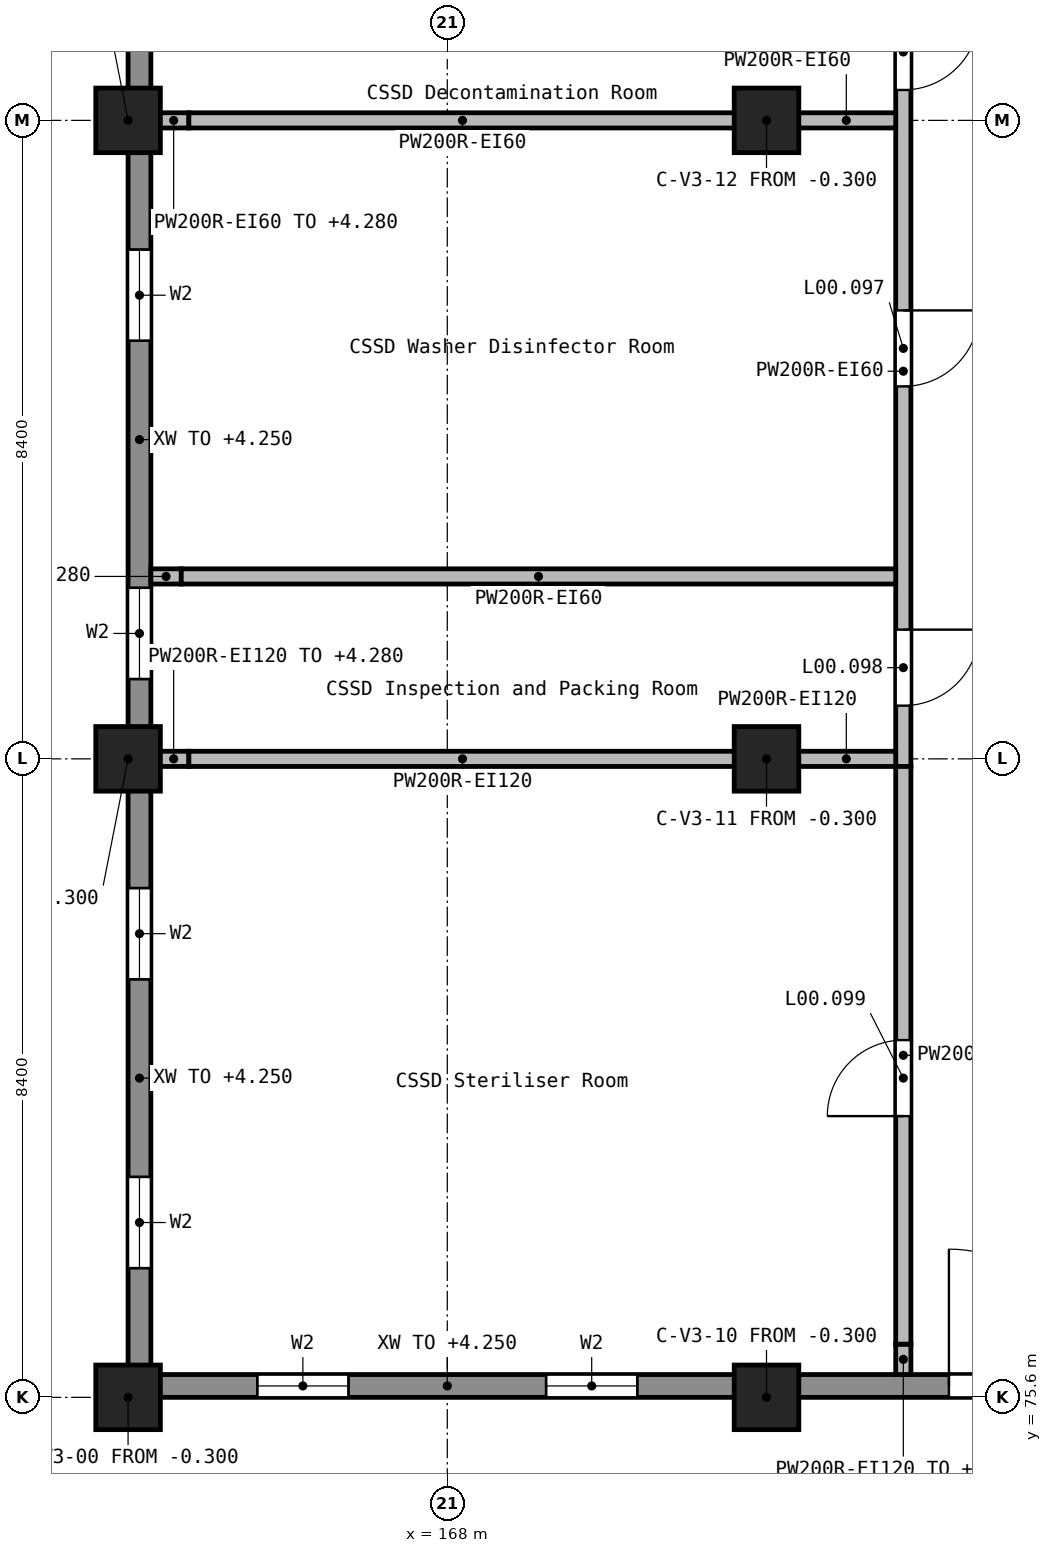
"""IFC4 building model, lengths in metres.
Left out: names, types, materials, properties, quantities, classifications, styles, units other than length and angle.
Written with IfcOpenShell. Run it as: python <this file> out.ifc"""

import sys

from ifc_helpers import new_model, si_unit, direction, frame, frame_2d, origin, origin_2d, place, context, subcontext, project, spatial, rectangle, extrude, element, fill, save


model = new_model("IFC4")
c1 = context("Model", 3, precision=1e-05, world=origin(), true_north=direction((0.0, 1.0)))
c2 = subcontext(c1, "Body", "Model", "MODEL_VIEW")
j1 = project(units=[si_unit("LENGTHUNIT", "METRE"), si_unit("PLANEANGLEUNIT", "RADIAN")], contexts=[c1])
p1 = place(None, origin())
s1 = spatial("IfcSite", under=j1, at=p1, CompositionType="ELEMENT")
p2 = place(p1, origin())
s2 = spatial("IfcBuilding", under=s1, at=p2, CompositionType="ELEMENT")
p3 = place(p2, origin())
s3 = spatial("IfcBuildingStorey", under=s2, at=p3, CompositionType="ELEMENT", Elevation=0.0)
for number, where, z_axis, x_axis in (
    (1, (163.8, 75.6, -0.3), (0.0, 0.0, 1.0), (1.0, 0.0, 0.0)),
    (2, (163.8, 84.0, -0.3), (0.0, 0.0, 1.0), (1.0, 0.0, 0.0)),
    (3, (163.8, 92.4, -0.3), (0.0, 0.0, 1.0), (1.0, 0.0, 0.0)),
    (4, (172.2, 75.6, -0.3), (0.0, 0.0, 1.0), (1.0, 0.0, 0.0)),
    (5, (172.2, 84.0, -0.3), (0.0, 0.0, 1.0), (1.0, 0.0, 0.0)),
    (6, (172.2, 92.4, -0.3), (0.0, 0.0, 1.0), (1.0, 0.0, 0.0)),
):
    element("IfcColumn", number, at=place(p3, frame(where, z_axis=z_axis, x_axis=x_axis)), inside=s3, PredefinedType="COLUMN", context=c2, shape_type="SweptSolid", body=[
        extrude(rectangle(XDim=0.85, YDim=0.85, at=origin_2d()), origin(), (0.0, 0.0, 1.0), 5.7),
    ])
p4 = place(p3, frame((163.95, 94.025, 0.0), z_axis=(0.0, 0.0, 1.0), x_axis=(0.0, -1.0, 0.0)))
e7 = element("IfcWall", 7, at=p4, inside=s3, PredefinedType="STANDARD", context=c2, shape_type="SweptSolid", body=[
    extrude(rectangle(XDim=1.225, YDim=0.3, at=frame_2d((0.612, 0.0))), origin(), (0.0, 0.0, 1.0), 4.25),
])
p5 = place(p3, frame((163.95, 92.0, 0.0), z_axis=(0.0, 0.0, 1.0), x_axis=(0.0, -1.0, 0.0)))
e8 = element("IfcWall", 8, at=p5, inside=s3, PredefinedType="STANDARD", context=c2, shape_type="SweptSolid", body=[
    extrude(rectangle(XDim=7.6, YDim=0.3, at=frame_2d((3.8, 0.0))), origin(), (0.0, 0.0, 1.0), 4.25),
])
p6 = place(p5, frame((1.3, 0.0, 1.2)))
e9 = element("IfcOpeningElement", 9, at=p6, cuts=e8, PredefinedType="OPENING", context=c2, shape_type="SweptSolid", body=[
    extrude(rectangle(XDim=1.2, YDim=1.2, at=frame_2d((0.6, 0.6))), frame((0.0, 0.16, 0.0), z_axis=(0.0, -1.0, 0.0), x_axis=(1.0, 0.0, 0.0)), (0.0, 0.0, 1.0), 0.32),
])
p7 = place(p5, frame((5.75, 0.0, 1.2)))
e10 = element("IfcOpeningElement", 10, at=p7, cuts=e8, PredefinedType="OPENING", context=c2, shape_type="SweptSolid", body=[
    extrude(rectangle(XDim=1.2, YDim=1.2, at=frame_2d((0.6, 0.6))), frame((0.0, 0.16, 0.0), z_axis=(0.0, -1.0, 0.0), x_axis=(1.0, 0.0, 0.0)), (0.0, 0.0, 1.0), 0.32),
])
p8 = place(p3, frame((163.95, 83.6, 0.0), z_axis=(0.0, 0.0, 1.0), x_axis=(0.0, -1.0, 0.0)))
e11 = element("IfcWall", 11, at=p8, inside=s3, PredefinedType="STANDARD", context=c2, shape_type="SweptSolid", body=[
    extrude(rectangle(XDim=7.6, YDim=0.3, at=frame_2d((3.8, 0.0))), origin(), (0.0, 0.0, 1.0), 4.25),
])
p9 = place(p8, frame((1.3, 0.0, 1.2)))
e12 = element("IfcOpeningElement", 12, at=p9, cuts=e11, PredefinedType="OPENING", context=c2, shape_type="SweptSolid", body=[
    extrude(rectangle(XDim=1.2, YDim=1.2, at=frame_2d((0.6, 0.6))), frame((0.0, 0.16, 0.0), z_axis=(0.0, -1.0, 0.0), x_axis=(1.0, 0.0, 0.0)), (0.0, 0.0, 1.0), 0.32),
])
p10 = place(p8, frame((5.1, 0.0, 1.2)))
e13 = element("IfcOpeningElement", 13, at=p10, cuts=e11, PredefinedType="OPENING", context=c2, shape_type="SweptSolid", body=[
    extrude(rectangle(XDim=1.2, YDim=1.2, at=frame_2d((0.6, 0.6))), frame((0.0, 0.16, 0.0), z_axis=(0.0, -1.0, 0.0), x_axis=(1.0, 0.0, 0.0)), (0.0, 0.0, 1.0), 0.32),
])
p11 = place(p3, frame((164.2, 75.75, 0.0), z_axis=(0.0, 0.0, 1.0), x_axis=(1.0, 0.0, 0.0)))
e14 = element("IfcWall", 14, at=p11, inside=s3, PredefinedType="STANDARD", context=c2, shape_type="SweptSolid", body=[
    extrude(rectangle(XDim=7.6, YDim=0.3, at=frame_2d((3.8, 0.0))), origin(), (0.0, 0.0, 1.0), 4.25),
])
p12 = place(p11, frame((1.3, 0.0, 1.2)))
e15 = element("IfcOpeningElement", 15, at=p12, cuts=e14, PredefinedType="OPENING", context=c2, shape_type="SweptSolid", body=[
    extrude(rectangle(XDim=1.2, YDim=1.2, at=frame_2d((0.6, 0.6))), frame((0.0, 0.16, 0.0), z_axis=(0.0, -1.0, 0.0), x_axis=(1.0, 0.0, 0.0)), (0.0, 0.0, 1.0), 0.32),
])
p13 = place(p11, frame((5.1, 0.0, 1.2)))
e16 = element("IfcOpeningElement", 16, at=p13, cuts=e14, PredefinedType="OPENING", context=c2, shape_type="SweptSolid", body=[
    extrude(rectangle(XDim=1.2, YDim=1.2, at=frame_2d((0.6, 0.6))), frame((0.0, 0.16, 0.0), z_axis=(0.0, -1.0, 0.0), x_axis=(1.0, 0.0, 0.0)), (0.0, 0.0, 1.0), 0.32),
])
p14 = place(p3, frame((172.6, 75.75, 0.0), z_axis=(0.0, 0.0, 1.0), x_axis=(1.0, 0.0, 0.0)))
e17 = element("IfcWall", 17, at=p14, inside=s3, PredefinedType="STANDARD", context=c2, shape_type="SweptSolid", body=[
    extrude(rectangle(XDim=7.6, YDim=0.3, at=frame_2d((3.8, 0.0))), origin(), (0.0, 0.0, 1.0), 4.25),
])
p15 = place(p14, frame((2.0, 0.0, 0.0)))
e18 = element("IfcOpeningElement", 18, at=p15, cuts=e17, PredefinedType="OPENING", context=c2, shape_type="SweptSolid", body=[
    extrude(rectangle(XDim=1.8, YDim=2.1, at=frame_2d((0.9, 1.05))), frame((0.0, 0.16, 0.0), z_axis=(0.0, -1.0, 0.0), x_axis=(1.0, 0.0, 0.0)), (0.0, 0.0, 1.0), 0.32),
])
p16 = place(p14, frame((5.1, 0.0, 1.2)))
e19 = element("IfcOpeningElement", 19, at=p16, cuts=e17, PredefinedType="OPENING", context=c2, shape_type="SweptSolid", body=[
    extrude(rectangle(XDim=1.2, YDim=1.2, at=frame_2d((0.6, 0.6))), frame((0.0, 0.16, 0.0), z_axis=(0.0, -1.0, 0.0), x_axis=(1.0, 0.0, 0.0)), (0.0, 0.0, 1.0), 0.32),
])
p17 = place(p3, frame((174.0, 94.3, 0.0), z_axis=(0.0, 0.0, 1.0), x_axis=(0.0, -1.0, 0.0)))
e20 = element("IfcWall", 20, at=p17, inside=s3, PredefinedType="SOLIDWALL", context=c2, shape_type="SweptSolid", body=[
    extrude(rectangle(XDim=10.4, YDim=0.2, at=frame_2d((5.2, 0.0))), origin(), (0.0, 0.0, 1.0), 5.05),
])
p18 = place(p17, frame((0.5, 0.0, 0.0)))
e21 = element("IfcOpeningElement", 21, at=p18, cuts=e20, PredefinedType="OPENING", context=c2, shape_type="SweptSolid", body=[
    extrude(rectangle(XDim=1.0, YDim=2.1, at=frame_2d((0.5, 1.05))), frame((0.0, 0.11, 0.0), z_axis=(0.0, -1.0, 0.0), x_axis=(1.0, 0.0, 0.0)), (0.0, 0.0, 1.0), 0.22),
])
p19 = place(p17, frame((4.4, 0.0, 0.0)))
e22 = element("IfcOpeningElement", 22, at=p19, cuts=e20, PredefinedType="OPENING", context=c2, shape_type="SweptSolid", body=[
    extrude(rectangle(XDim=1.0, YDim=2.1, at=frame_2d((0.5, 1.05))), frame((0.0, 0.11, 0.0), z_axis=(0.0, -1.0, 0.0), x_axis=(1.0, 0.0, 0.0)), (0.0, 0.0, 1.0), 0.22),
])
p20 = place(p17, frame((8.6, 0.0, 0.0)))
e23 = element("IfcOpeningElement", 23, at=p20, cuts=e20, PredefinedType="OPENING", context=c2, shape_type="SweptSolid", body=[
    extrude(rectangle(XDim=1.0, YDim=2.1, at=frame_2d((0.5, 1.05))), frame((0.0, 0.11, 0.0), z_axis=(0.0, -1.0, 0.0), x_axis=(1.0, 0.0, 0.0)), (0.0, 0.0, 1.0), 0.22),
])
p21 = place(p3, frame((164.2, 84.0, 0.0), z_axis=(0.0, 0.0, 1.0), x_axis=(1.0, 0.0, 0.0)))
e24 = element("IfcWall", 24, at=p21, inside=s3, PredefinedType="SOLIDWALL", context=c2, shape_type="SweptSolid", body=[
    extrude(rectangle(XDim=0.4, YDim=0.2, at=frame_2d((0.2, 0.0))), origin(), (0.0, 0.0, 1.0), 4.28),
])
p22 = place(p3, frame((164.6, 84.0, 0.0), z_axis=(0.0, 0.0, 1.0), x_axis=(1.0, 0.0, 0.0)))
e25 = element("IfcWall", 25, at=p22, inside=s3, PredefinedType="SOLIDWALL", context=c2, shape_type="SweptSolid", body=[
    extrude(rectangle(XDim=7.2, YDim=0.2, at=frame_2d((3.6, 0.0))), origin(), (0.0, 0.0, 1.0), 5.05),
])
p23 = place(p3, frame((172.6, 84.0, 0.0), z_axis=(0.0, 0.0, 1.0), x_axis=(1.0, 0.0, 0.0)))
e26 = element("IfcWall", 26, at=p23, inside=s3, PredefinedType="SOLIDWALL", context=c2, shape_type="SweptSolid", body=[
    extrude(rectangle(XDim=1.3, YDim=0.2, at=frame_2d((0.65, 0.0))), origin(), (0.0, 0.0, 1.0), 5.05),
])
p24 = place(p3, frame((164.1, 86.4, 0.0), z_axis=(0.0, 0.0, 1.0), x_axis=(1.0, 0.0, 0.0)))
e27 = element("IfcWall", 27, at=p24, inside=s3, PredefinedType="SOLIDWALL", context=c2, shape_type="SweptSolid", body=[
    extrude(rectangle(XDim=0.4, YDim=0.2, at=frame_2d((0.2, 0.0))), origin(), (0.0, 0.0, 1.0), 4.28),
])
p25 = place(p3, frame((164.5, 86.4, 0.0), z_axis=(0.0, 0.0, 1.0), x_axis=(1.0, 0.0, 0.0)))
e28 = element("IfcWall", 28, at=p25, inside=s3, PredefinedType="SOLIDWALL", context=c2, shape_type="SweptSolid", body=[
    extrude(rectangle(XDim=9.4, YDim=0.2, at=frame_2d((4.7, 0.0))), origin(), (0.0, 0.0, 1.0), 5.05),
])
p26 = place(p3, frame((164.2, 92.4, 0.0), z_axis=(0.0, 0.0, 1.0), x_axis=(1.0, 0.0, 0.0)))
e29 = element("IfcWall", 29, at=p26, inside=s3, PredefinedType="SOLIDWALL", context=c2, shape_type="SweptSolid", body=[
    extrude(rectangle(XDim=0.4, YDim=0.2, at=frame_2d((0.2, 0.0))), origin(), (0.0, 0.0, 1.0), 4.28),
])
p27 = place(p3, frame((164.6, 92.4, 0.0), z_axis=(0.0, 0.0, 1.0), x_axis=(1.0, 0.0, 0.0)))
e30 = element("IfcWall", 30, at=p27, inside=s3, PredefinedType="SOLIDWALL", context=c2, shape_type="SweptSolid", body=[
    extrude(rectangle(XDim=7.2, YDim=0.2, at=frame_2d((3.6, 0.0))), origin(), (0.0, 0.0, 1.0), 5.05),
])
p28 = place(p3, frame((172.6, 92.4, 0.0), z_axis=(0.0, 0.0, 1.0), x_axis=(1.0, 0.0, 0.0)))
e31 = element("IfcWall", 31, at=p28, inside=s3, PredefinedType="SOLIDWALL", context=c2, shape_type="SweptSolid", body=[
    extrude(rectangle(XDim=1.3, YDim=0.2, at=frame_2d((0.65, 0.0))), origin(), (0.0, 0.0, 1.0), 5.05),
])
p29 = place(p3, frame((174.0, 75.9, 0.0), z_axis=(0.0, 0.0, 1.0), x_axis=(0.0, 1.0, 0.0)))
e32 = element("IfcWall", 32, at=p29, inside=s3, PredefinedType="SOLIDWALL", context=c2, shape_type="SweptSolid", body=[
    extrude(rectangle(XDim=0.4, YDim=0.2, at=frame_2d((0.2, 0.0))), origin(), (0.0, 0.0, 1.0), 4.28),
])
p30 = place(p3, frame((174.0, 76.3, 0.0), z_axis=(0.0, 0.0, 1.0), x_axis=(0.0, 1.0, 0.0)))
e33 = element("IfcWall", 33, at=p30, inside=s3, PredefinedType="SOLIDWALL", context=c2, shape_type="SweptSolid", body=[
    extrude(rectangle(XDim=7.6, YDim=0.2, at=frame_2d((3.8, 0.0))), origin(), (0.0, 0.0, 1.0), 5.05),
])
p31 = place(p30, frame((3.0, 0.0, 0.0)))
e34 = element("IfcOpeningElement", 34, at=p31, cuts=e33, PredefinedType="OPENING", context=c2, shape_type="SweptSolid", body=[
    extrude(rectangle(XDim=1.0, YDim=2.1, at=frame_2d((0.5, 1.05))), frame((0.0, 0.11, 0.0), z_axis=(0.0, -1.0, 0.0), x_axis=(1.0, 0.0, 0.0)), (0.0, 0.0, 1.0), 0.22),
])
p32 = place(p15, frame((1.8, 0.0, 0.0), z_axis=(0.0, 0.0, 1.0), x_axis=(-1.0, 0.0, 0.0)))
e35 = element("IfcDoor", 35, at=p32, inside=s3, OperationType="SINGLE_SWING_LEFT", PredefinedType="DOOR", context=c2, shape_type="SweptSolid", body=[
    extrude(rectangle(XDim=1.8, YDim=2.1, at=frame_2d((0.9, 1.05))), frame((0.0, 0.025, 0.0), z_axis=(0.0, -1.0, 0.0), x_axis=(1.0, 0.0, 0.0)), (0.0, 0.0, 1.0), 0.05),
])
fill(e18, e35)
p33 = place(p6, origin())
e36 = element("IfcWindow", 36, at=p33, inside=s3, PartitioningType="SINGLE_PANEL", PredefinedType="WINDOW", context=c2, shape_type="SweptSolid", body=[
    extrude(rectangle(XDim=1.2, YDim=1.2, at=frame_2d((0.6, 0.6))), frame((0.0, 0.03, 0.0), z_axis=(0.0, -1.0, 0.0), x_axis=(1.0, 0.0, 0.0)), (0.0, 0.0, 1.0), 0.06),
])
fill(e9, e36)
p34 = place(p7, origin())
e37 = element("IfcWindow", 37, at=p34, inside=s3, PartitioningType="SINGLE_PANEL", PredefinedType="WINDOW", context=c2, shape_type="SweptSolid", body=[
    extrude(rectangle(XDim=1.2, YDim=1.2, at=frame_2d((0.6, 0.6))), frame((0.0, 0.03, 0.0), z_axis=(0.0, -1.0, 0.0), x_axis=(1.0, 0.0, 0.0)), (0.0, 0.0, 1.0), 0.06),
])
fill(e10, e37)
p35 = place(p9, origin())
e38 = element("IfcWindow", 38, at=p35, inside=s3, PartitioningType="SINGLE_PANEL", PredefinedType="WINDOW", context=c2, shape_type="SweptSolid", body=[
    extrude(rectangle(XDim=1.2, YDim=1.2, at=frame_2d((0.6, 0.6))), frame((0.0, 0.03, 0.0), z_axis=(0.0, -1.0, 0.0), x_axis=(1.0, 0.0, 0.0)), (0.0, 0.0, 1.0), 0.06),
])
fill(e12, e38)
p36 = place(p10, origin())
e39 = element("IfcWindow", 39, at=p36, inside=s3, PartitioningType="SINGLE_PANEL", PredefinedType="WINDOW", context=c2, shape_type="SweptSolid", body=[
    extrude(rectangle(XDim=1.2, YDim=1.2, at=frame_2d((0.6, 0.6))), frame((0.0, 0.03, 0.0), z_axis=(0.0, -1.0, 0.0), x_axis=(1.0, 0.0, 0.0)), (0.0, 0.0, 1.0), 0.06),
])
fill(e13, e39)
p37 = place(p12, origin())
e40 = element("IfcWindow", 40, at=p37, inside=s3, PartitioningType="SINGLE_PANEL", PredefinedType="WINDOW", context=c2, shape_type="SweptSolid", body=[
    extrude(rectangle(XDim=1.2, YDim=1.2, at=frame_2d((0.6, 0.6))), frame((0.0, 0.03, 0.0), z_axis=(0.0, -1.0, 0.0), x_axis=(1.0, 0.0, 0.0)), (0.0, 0.0, 1.0), 0.06),
])
fill(e15, e40)
p38 = place(p13, origin())
e41 = element("IfcWindow", 41, at=p38, inside=s3, PartitioningType="SINGLE_PANEL", PredefinedType="WINDOW", context=c2, shape_type="SweptSolid", body=[
    extrude(rectangle(XDim=1.2, YDim=1.2, at=frame_2d((0.6, 0.6))), frame((0.0, 0.03, 0.0), z_axis=(0.0, -1.0, 0.0), x_axis=(1.0, 0.0, 0.0)), (0.0, 0.0, 1.0), 0.06),
])
fill(e16, e41)
p39 = place(p18, frame((1.0, 0.0, 0.0), z_axis=(0.0, 0.0, 1.0), x_axis=(-1.0, 0.0, 0.0)))
e42 = element("IfcDoor", 42, at=p39, inside=s3, OperationType="SINGLE_SWING_RIGHT", PredefinedType="DOOR", context=c2, shape_type="SweptSolid", body=[
    extrude(rectangle(XDim=1.0, YDim=2.1, at=frame_2d((0.5, 1.05))), frame((0.0, 0.025, 0.0), z_axis=(0.0, -1.0, 0.0), x_axis=(1.0, 0.0, 0.0)), (0.0, 0.0, 1.0), 0.05),
])
fill(e21, e42)
p40 = place(p19, frame((1.0, 0.0, 0.0), z_axis=(0.0, 0.0, 1.0), x_axis=(-1.0, 0.0, 0.0)))
e43 = element("IfcDoor", 43, at=p40, inside=s3, OperationType="SINGLE_SWING_RIGHT", PredefinedType="DOOR", context=c2, shape_type="SweptSolid", body=[
    extrude(rectangle(XDim=1.0, YDim=2.1, at=frame_2d((0.5, 1.05))), frame((0.0, 0.025, 0.0), z_axis=(0.0, -1.0, 0.0), x_axis=(1.0, 0.0, 0.0)), (0.0, 0.0, 1.0), 0.05),
])
fill(e22, e43)
p41 = place(p20, frame((1.0, 0.0, 0.0), z_axis=(0.0, 0.0, 1.0), x_axis=(-1.0, 0.0, 0.0)))
e44 = element("IfcDoor", 44, at=p41, inside=s3, OperationType="SINGLE_SWING_LEFT", PredefinedType="DOOR", context=c2, shape_type="SweptSolid", body=[
    extrude(rectangle(XDim=1.0, YDim=2.1, at=frame_2d((0.5, 1.05))), frame((0.0, 0.025, 0.0), z_axis=(0.0, -1.0, 0.0), x_axis=(1.0, 0.0, 0.0)), (0.0, 0.0, 1.0), 0.05),
])
fill(e23, e44)
p42 = place(p31, origin())
e45 = element("IfcDoor", 45, at=p42, inside=s3, OperationType="SINGLE_SWING_LEFT", PredefinedType="DOOR", context=c2, shape_type="SweptSolid", body=[
    extrude(rectangle(XDim=1.0, YDim=2.1, at=frame_2d((0.5, 1.05))), frame((0.0, 0.025, 0.0), z_axis=(0.0, -1.0, 0.0), x_axis=(1.0, 0.0, 0.0)), (0.0, 0.0, 1.0), 0.05),
])
fill(e34, e45)
save(model, sys.argv[1])
